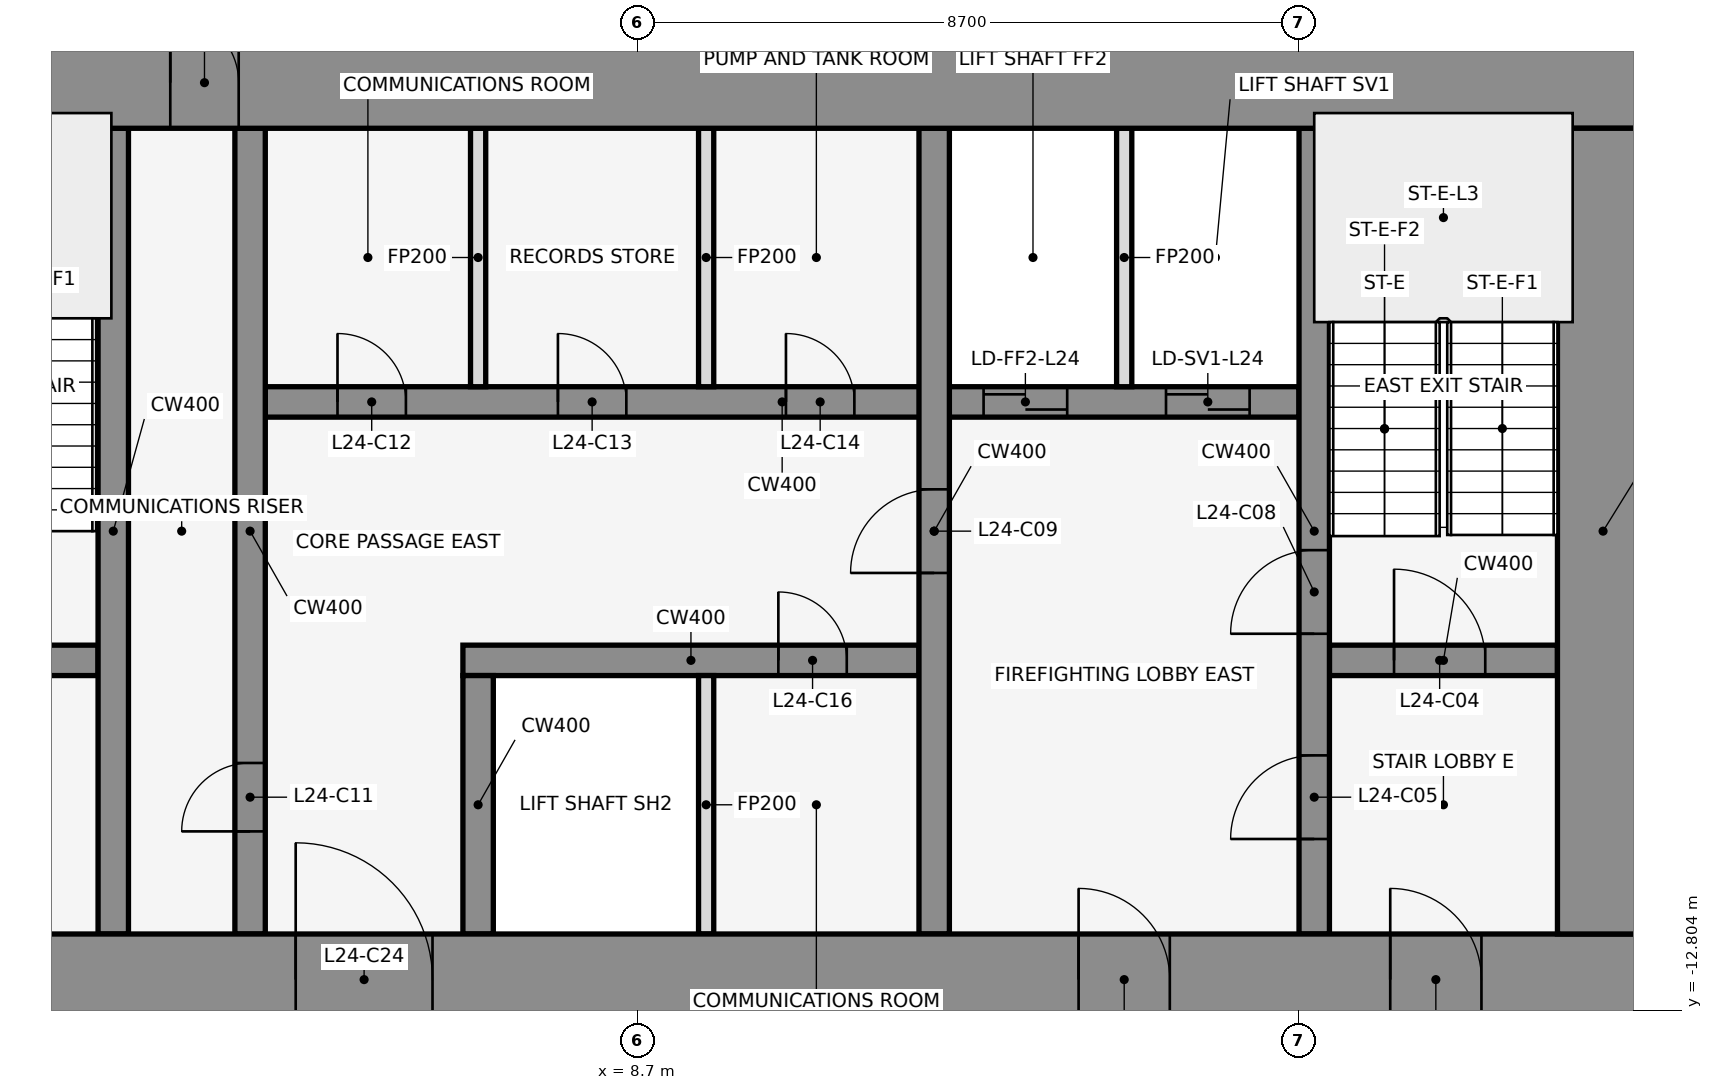
"""IFC4 building model, lengths in metres.
Left out: names, types, materials, properties, quantities, classifications, styles, units other than length and angle.
Written with IfcOpenShell. Run it as: python <this file> out.ifc"""

import sys

from ifc_helpers import new_model, si_unit, direction, frame, frame_2d, origin, place, context, subcontext, project, spatial, rectangle, extrude, element, fill, save


model = new_model("IFC4")
c1 = context("Model", 3, precision=1e-05, world=origin(), true_north=direction((0.0, 1.0)))
c2 = subcontext(c1, "Body", "Model", "MODEL_VIEW")
j1 = project(units=[si_unit("LENGTHUNIT", "METRE"), si_unit("PLANEANGLEUNIT", "RADIAN")], contexts=[c1])
p1 = place(None, origin())
s1 = spatial("IfcSite", under=j1, at=p1, CompositionType="ELEMENT")
p2 = place(p1, origin())
s2 = spatial("IfcBuilding", under=s1, at=p2, CompositionType="ELEMENT")
p3 = place(p2, frame((0.0, 0.0, 114.5)))
s3 = spatial("IfcBuildingStorey", under=s2, at=p3, CompositionType="ELEMENT", Elevation=114.5)
for number, where, z_axis, x_axis in (
    (1, (16.432, -0.105, 0.0), (0.0, 0.0, 1.0), (-0.84, 0.543, 0.0)),
    (2, (1.901, 1.08, 0.0), (0.0, 0.0, 1.0), (-0.84, -0.543, 0.0)),
):
    element("IfcWall", number, at=place(p3, frame(where, z_axis=z_axis, x_axis=x_axis)), inside=s3, PredefinedType="STANDARD", context=c2, shape_type="SweptSolid", body=[
        extrude(rectangle(XDim=2.183, YDim=0.25, at=frame_2d((1.091, 0.0))), origin(), (0.0, 0.0, 1.0), 3.95),
    ])
p4 = place(p3, frame((-1.6, -8.2, 0.0), z_axis=(0.0, 0.0, 1.0), x_axis=(1.0, 0.0, 0.0)))
e3 = element("IfcWall", 3, at=p4, inside=s3, PredefinedType="SHEAR", context=c2, shape_type="SweptSolid", body=[
    extrude(rectangle(XDim=3.2, YDim=0.4, at=frame_2d((1.6, 0.0))), origin(), (0.0, 0.0, 1.0), 4.1),
])
p5 = place(p4, frame((1.05, 0.0, 0.0)))
e4 = element("IfcOpeningElement", 4, at=p5, cuts=e3, PredefinedType="OPENING", context=c2, shape_type="SweptSolid", body=[
    extrude(rectangle(XDim=1.2, YDim=2.1, at=frame_2d((0.6, 1.05))), frame((0.0, 0.212, 0.0), z_axis=(0.0, -1.0, 0.0), x_axis=(1.0, 0.0, 0.0)), (0.0, 0.0, 1.0), 0.424),
])
p6 = place(p3, frame((6.4, -8.2, 0.0), z_axis=(0.0, 0.0, 1.0), x_axis=(1.0, 0.0, 0.0)))
e5 = element("IfcWall", 5, at=p6, inside=s3, PredefinedType="SHEAR", context=c2, shape_type="SweptSolid", body=[
    extrude(rectangle(XDim=6.0, YDim=0.4, at=frame_2d((3.0, 0.0))), origin(), (0.0, 0.0, 1.0), 4.1),
])
p7 = place(p6, frame((4.15, 0.0, 0.0)))
e6 = element("IfcOpeningElement", 6, at=p7, cuts=e5, PredefinedType="OPENING", context=c2, shape_type="SweptSolid", body=[
    extrude(rectangle(XDim=0.9, YDim=2.1, at=frame_2d((0.45, 1.05))), frame((0.0, 0.212, 0.0), z_axis=(0.0, -1.0, 0.0), x_axis=(1.0, 0.0, 0.0)), (0.0, 0.0, 1.0), 0.424),
])
p8 = place(p3, frame((17.8, -8.2, 0.0), z_axis=(0.0, 0.0, 1.0), x_axis=(1.0, 0.0, 0.0)))
e7 = element("IfcWall", 7, at=p8, inside=s3, PredefinedType="SHEAR", context=c2, shape_type="SweptSolid", body=[
    extrude(rectangle(XDim=3.0, YDim=0.4, at=frame_2d((1.5, 0.0))), origin(), (0.0, 0.0, 1.0), 4.1),
])
p9 = place(p8, frame((0.85, 0.0, 0.0)))
e8 = element("IfcOpeningElement", 8, at=p9, cuts=e7, PredefinedType="OPENING", context=c2, shape_type="SweptSolid", body=[
    extrude(rectangle(XDim=1.2, YDim=2.1, at=frame_2d((0.6, 1.05))), frame((0.0, 0.212, 0.0), z_axis=(0.0, -1.0, 0.0), x_axis=(1.0, 0.0, 0.0)), (0.0, 0.0, 1.0), 0.424),
])
p10 = place(p3, frame((3.8, -4.8, 0.0), z_axis=(0.0, 0.0, 1.0), x_axis=(1.0, 0.0, 0.0)))
e9 = element("IfcWall", 9, at=p10, inside=s3, PredefinedType="SHEAR", context=c2, shape_type="SweptSolid", body=[
    extrude(rectangle(XDim=13.6, YDim=0.4, at=frame_2d((6.8, 0.0))), origin(), (0.0, 0.0, 1.0), 4.1),
])
p11 = place(p10, frame((9.45, 0.0, 0.0)))
e10 = element("IfcOpeningElement", 10, at=p11, cuts=e9, PredefinedType="OPENING", context=c2, shape_type="SweptSolid", body=[
    extrude(rectangle(XDim=1.1, YDim=2.1, at=frame_2d((0.55, 1.05))), frame((0.0, 0.212, 0.0), z_axis=(0.0, -1.0, 0.0), x_axis=(1.0, 0.0, 0.0)), (0.0, 0.0, 1.0), 0.424),
])
p12 = place(p10, frame((11.85, 0.0, 0.0)))
e11 = element("IfcOpeningElement", 11, at=p12, cuts=e9, PredefinedType="OPENING", context=c2, shape_type="SweptSolid", body=[
    extrude(rectangle(XDim=1.1, YDim=2.1, at=frame_2d((0.55, 1.05))), frame((0.0, 0.212, 0.0), z_axis=(0.0, -1.0, 0.0), x_axis=(1.0, 0.0, 0.0)), (0.0, 0.0, 1.0), 0.424),
])
p13 = place(p10, frame((0.95, 0.0, 0.0)))
e12 = element("IfcOpeningElement", 12, at=p13, cuts=e9, PredefinedType="OPENING", context=c2, shape_type="SweptSolid", body=[
    extrude(rectangle(XDim=0.9, YDim=2.1, at=frame_2d((0.45, 1.05))), frame((0.0, 0.212, 0.0), z_axis=(0.0, -1.0, 0.0), x_axis=(1.0, 0.0, 0.0)), (0.0, 0.0, 1.0), 0.424),
])
p14 = place(p10, frame((3.85, 0.0, 0.0)))
e13 = element("IfcOpeningElement", 13, at=p14, cuts=e9, PredefinedType="OPENING", context=c2, shape_type="SweptSolid", body=[
    extrude(rectangle(XDim=0.9, YDim=2.1, at=frame_2d((0.45, 1.05))), frame((0.0, 0.212, 0.0), z_axis=(0.0, -1.0, 0.0), x_axis=(1.0, 0.0, 0.0)), (0.0, 0.0, 1.0), 0.424),
])
p15 = place(p10, frame((6.85, 0.0, 0.0)))
e14 = element("IfcOpeningElement", 14, at=p15, cuts=e9, PredefinedType="OPENING", context=c2, shape_type="SweptSolid", body=[
    extrude(rectangle(XDim=0.9, YDim=2.1, at=frame_2d((0.45, 1.05))), frame((0.0, 0.212, 0.0), z_axis=(0.0, -1.0, 0.0), x_axis=(1.0, 0.0, 0.0)), (0.0, 0.0, 1.0), 0.424),
])
p16 = place(p3, frame((1.8, -11.8, 0.0), z_axis=(0.0, 0.0, 1.0), x_axis=(0.0, 1.0, 0.0)))
e15 = element("IfcWall", 15, at=p16, inside=s3, PredefinedType="SHEAR", context=c2, shape_type="SweptSolid", body=[
    extrude(rectangle(XDim=10.6, YDim=0.4, at=frame_2d((5.3, 0.0))), origin(), (0.0, 0.0, 1.0), 4.1),
])
p17 = place(p3, frame((3.6, -11.8, 0.0), z_axis=(0.0, 0.0, 1.0), x_axis=(0.0, 1.0, 0.0)))
e16 = element("IfcWall", 16, at=p17, inside=s3, PredefinedType="SHEAR", context=c2, shape_type="SweptSolid", body=[
    extrude(rectangle(XDim=10.6, YDim=0.4, at=frame_2d((5.3, 0.0))), origin(), (0.0, 0.0, 1.0), 4.1),
])
p18 = place(p17, frame((1.35, 0.0, 0.0)))
e17 = element("IfcOpeningElement", 17, at=p18, cuts=e16, PredefinedType="OPENING", context=c2, shape_type="SweptSolid", body=[
    extrude(rectangle(XDim=0.9, YDim=2.1, at=frame_2d((0.45, 1.05))), frame((0.0, 0.212, 0.0), z_axis=(0.0, -1.0, 0.0), x_axis=(1.0, 0.0, 0.0)), (0.0, 0.0, 1.0), 0.424),
])
p19 = place(p3, frame((6.6, -11.8, 0.0), z_axis=(0.0, 0.0, 1.0), x_axis=(0.0, 1.0, 0.0)))
e18 = element("IfcWall", 18, at=p19, inside=s3, PredefinedType="SHEAR", context=c2, shape_type="SweptSolid", body=[
    extrude(rectangle(XDim=3.4, YDim=0.4, at=frame_2d((1.7, 0.0))), origin(), (0.0, 0.0, 1.0), 4.1),
])
for number, where, z_axis, x_axis in (
    (19, (6.6, -4.6, 0.0), (0.0, 0.0, 1.0), (0.0, 1.0, 0.0)),
    (20, (9.6, -11.8, 0.0), (0.0, 0.0, 1.0), (0.0, 1.0, 0.0)),
    (21, (9.6, -4.6, 0.0), (0.0, 0.0, 1.0), (0.0, 1.0, 0.0)),
):
    element("IfcWall", number, at=place(p3, frame(where, z_axis=z_axis, x_axis=x_axis)), inside=s3, PredefinedType="PARTITIONING", context=c2, shape_type="SweptSolid", body=[
        extrude(rectangle(XDim=3.4, YDim=0.2, at=frame_2d((1.7, 0.0))), origin(), (0.0, 0.0, 1.0), 3.018),
    ])
p20 = place(p3, frame((12.6, -11.8, 0.0), z_axis=(0.0, 0.0, 1.0), x_axis=(0.0, 1.0, 0.0)))
e22 = element("IfcWall", 22, at=p20, inside=s3, PredefinedType="SHEAR", context=c2, shape_type="SweptSolid", body=[
    extrude(rectangle(XDim=10.6, YDim=0.4, at=frame_2d((5.3, 0.0))), origin(), (0.0, 0.0, 1.0), 4.1),
])
p21 = place(p20, frame((4.75, 0.0, 0.0)))
e23 = element("IfcOpeningElement", 23, at=p21, cuts=e22, PredefinedType="OPENING", context=c2, shape_type="SweptSolid", body=[
    extrude(rectangle(XDim=1.1, YDim=2.1, at=frame_2d((0.55, 1.05))), frame((0.0, 0.212, 0.0), z_axis=(0.0, -1.0, 0.0), x_axis=(1.0, 0.0, 0.0)), (0.0, 0.0, 1.0), 0.424),
])
p22 = place(p3, frame((15.1, -4.6, 0.0), z_axis=(0.0, 0.0, 1.0), x_axis=(0.0, 1.0, 0.0)))
e24 = element("IfcWall", 24, at=p22, inside=s3, PredefinedType="PARTITIONING", context=c2, shape_type="SweptSolid", body=[
    extrude(rectangle(XDim=3.4, YDim=0.2, at=frame_2d((1.7, 0.0))), origin(), (0.0, 0.0, 1.0), 3.018),
])
p23 = place(p3, frame((17.6, -11.8, 0.0), z_axis=(0.0, 0.0, 1.0), x_axis=(0.0, 1.0, 0.0)))
e25 = element("IfcWall", 25, at=p23, inside=s3, PredefinedType="SHEAR", context=c2, shape_type="SweptSolid", body=[
    extrude(rectangle(XDim=10.6, YDim=0.4, at=frame_2d((5.3, 0.0))), origin(), (0.0, 0.0, 1.0), 4.1),
])
p24 = place(p23, frame((1.25, 0.0, 0.0)))
e26 = element("IfcOpeningElement", 26, at=p24, cuts=e25, PredefinedType="OPENING", context=c2, shape_type="SweptSolid", body=[
    extrude(rectangle(XDim=1.1, YDim=2.1, at=frame_2d((0.55, 1.05))), frame((0.0, 0.212, 0.0), z_axis=(0.0, -1.0, 0.0), x_axis=(1.0, 0.0, 0.0)), (0.0, 0.0, 1.0), 0.424),
])
p25 = place(p23, frame((3.95, 0.0, 0.0)))
e27 = element("IfcOpeningElement", 27, at=p25, cuts=e25, PredefinedType="OPENING", context=c2, shape_type="SweptSolid", body=[
    extrude(rectangle(XDim=1.1, YDim=2.1, at=frame_2d((0.55, 1.05))), frame((0.0, 0.212, 0.0), z_axis=(0.0, -1.0, 0.0), x_axis=(1.0, 0.0, 0.0)), (0.0, 0.0, 1.0), 0.424),
])
p26 = place(p3, frame((-22.0, -0.6, 0.0), z_axis=(0.0, 0.0, 1.0), x_axis=(1.0, 0.0, 0.0)))
e28 = element("IfcWall", 28, at=p26, inside=s3, PredefinedType="SHEAR", context=c2, shape_type="SweptSolid", body=[
    extrude(rectangle(XDim=44.0, YDim=1.2, at=frame_2d((22.0, 0.0))), origin(), (0.0, 0.0, 1.0), 4.1),
])
p27 = place(p26, frame((18.55, 0.0, 0.0)))
e29 = element("IfcOpeningElement", 29, at=p27, cuts=e28, PredefinedType="OPENING", context=c2, shape_type="SweptSolid", body=[
    extrude(rectangle(XDim=0.9, YDim=2.1, at=frame_2d((0.45, 1.05))), frame((0.0, 0.612, 0.0), z_axis=(0.0, -1.0, 0.0), x_axis=(1.0, 0.0, 0.0)), (0.0, 0.0, 1.0), 1.224),
])
p28 = place(p26, frame((24.55, 0.0, 0.0)))
e30 = element("IfcOpeningElement", 30, at=p28, cuts=e28, PredefinedType="OPENING", context=c2, shape_type="SweptSolid", body=[
    extrude(rectangle(XDim=0.9, YDim=2.1, at=frame_2d((0.45, 1.05))), frame((0.0, 0.612, 0.0), z_axis=(0.0, -1.0, 0.0), x_axis=(1.0, 0.0, 0.0)), (0.0, 0.0, 1.0), 1.224),
])
p29 = place(p3, frame((-22.0, -12.4, 0.0), z_axis=(0.0, 0.0, 1.0), x_axis=(1.0, 0.0, 0.0)))
e31 = element("IfcWall", 31, at=p29, inside=s3, PredefinedType="SHEAR", context=c2, shape_type="SweptSolid", body=[
    extrude(rectangle(XDim=44.0, YDim=1.2, at=frame_2d((22.0, 0.0))), origin(), (0.0, 0.0, 1.0), 4.1),
])
p30 = place(p29, frame((2.2, 0.0, 0.0)))
e32 = element("IfcOpeningElement", 32, at=p30, cuts=e31, PredefinedType="OPENING", context=c2, shape_type="SweptSolid", body=[
    extrude(rectangle(XDim=1.2, YDim=2.1, at=frame_2d((0.6, 1.05))), frame((0.0, 0.612, 0.0), z_axis=(0.0, -1.0, 0.0), x_axis=(1.0, 0.0, 0.0)), (0.0, 0.0, 1.0), 1.224),
])
p31 = place(p29, frame((21.4, 0.0, 0.0)))
e33 = element("IfcOpeningElement", 33, at=p31, cuts=e31, PredefinedType="OPENING", context=c2, shape_type="SweptSolid", body=[
    extrude(rectangle(XDim=1.2, YDim=2.1, at=frame_2d((0.6, 1.05))), frame((0.0, 0.612, 0.0), z_axis=(0.0, -1.0, 0.0), x_axis=(1.0, 0.0, 0.0)), (0.0, 0.0, 1.0), 1.224),
])
p32 = place(p29, frame((40.6, 0.0, 0.0)))
e34 = element("IfcOpeningElement", 34, at=p32, cuts=e31, PredefinedType="OPENING", context=c2, shape_type="SweptSolid", body=[
    extrude(rectangle(XDim=1.2, YDim=2.1, at=frame_2d((0.6, 1.05))), frame((0.0, 0.612, 0.0), z_axis=(0.0, -1.0, 0.0), x_axis=(1.0, 0.0, 0.0)), (0.0, 0.0, 1.0), 1.224),
])
p33 = place(p29, frame((16.0, 0.0, 0.0)))
e35 = element("IfcOpeningElement", 35, at=p33, cuts=e31, PredefinedType="OPENING", context=c2, shape_type="SweptSolid", body=[
    extrude(rectangle(XDim=1.8, YDim=2.1, at=frame_2d((0.9, 1.05))), frame((0.0, 0.612, 0.0), z_axis=(0.0, -1.0, 0.0), x_axis=(1.0, 0.0, 0.0)), (0.0, 0.0, 1.0), 1.224),
])
p34 = place(p29, frame((6.3, 0.0, 0.0)))
e36 = element("IfcOpeningElement", 36, at=p34, cuts=e31, PredefinedType="OPENING", context=c2, shape_type="SweptSolid", body=[
    extrude(rectangle(XDim=1.2, YDim=2.1, at=frame_2d((0.6, 1.05))), frame((0.0, 0.612, 0.0), z_axis=(0.0, -1.0, 0.0), x_axis=(1.0, 0.0, 0.0)), (0.0, 0.0, 1.0), 1.224),
])
p35 = place(p29, frame((26.2, 0.0, 0.0)))
e37 = element("IfcOpeningElement", 37, at=p35, cuts=e31, PredefinedType="OPENING", context=c2, shape_type="SweptSolid", body=[
    extrude(rectangle(XDim=1.8, YDim=2.1, at=frame_2d((0.9, 1.05))), frame((0.0, 0.612, 0.0), z_axis=(0.0, -1.0, 0.0), x_axis=(1.0, 0.0, 0.0)), (0.0, 0.0, 1.0), 1.224),
])
p36 = place(p29, frame((36.5, 0.0, 0.0)))
e38 = element("IfcOpeningElement", 38, at=p36, cuts=e31, PredefinedType="OPENING", context=c2, shape_type="SweptSolid", body=[
    extrude(rectangle(XDim=1.2, YDim=2.1, at=frame_2d((0.6, 1.05))), frame((0.0, 0.612, 0.0), z_axis=(0.0, -1.0, 0.0), x_axis=(1.0, 0.0, 0.0)), (0.0, 0.0, 1.0), 1.224),
])
p37 = place(p3, frame((21.4, -11.8, 0.0), z_axis=(0.0, 0.0, 1.0), x_axis=(0.0, 1.0, 0.0)))
e39 = element("IfcWall", 39, at=p37, inside=s3, PredefinedType="SHEAR", context=c2, shape_type="SweptSolid", body=[
    extrude(rectangle(XDim=10.6, YDim=1.2, at=frame_2d((5.3, 0.0))), origin(), (0.0, 0.0, 1.0), 4.1),
])
p38 = place(p9, origin())
e40 = element("IfcDoor", 40, at=p38, inside=s3, OperationType="SINGLE_SWING_RIGHT", PredefinedType="DOOR", context=c2, shape_type="SweptSolid", body=[
    extrude(rectangle(XDim=1.2, YDim=2.1, at=frame_2d((0.6, 1.05))), frame((0.0, 0.025, 0.0), z_axis=(0.0, -1.0, 0.0), x_axis=(1.0, 0.0, 0.0)), (0.0, 0.0, 1.0), 0.05),
])
fill(e8, e40)
p39 = place(p24, origin())
e41 = element("IfcDoor", 41, at=p39, inside=s3, OperationType="SINGLE_SWING_LEFT", PredefinedType="DOOR", context=c2, shape_type="SweptSolid", body=[
    extrude(rectangle(XDim=1.1, YDim=2.1, at=frame_2d((0.55, 1.05))), frame((0.0, 0.025, 0.0), z_axis=(0.0, -1.0, 0.0), x_axis=(1.0, 0.0, 0.0)), (0.0, 0.0, 1.0), 0.05),
])
fill(e26, e41)
p40 = place(p11, origin())
e42 = element("IfcDoor", 42, at=p40, inside=s3, OperationType="DOUBLE_DOOR_SLIDING", PredefinedType="DOOR", context=c2, shape_type="SweptSolid", body=[
    extrude(rectangle(XDim=1.1, YDim=2.1, at=frame_2d((0.55, 1.05))), frame((0.0, 0.025, 0.0), z_axis=(0.0, -1.0, 0.0), x_axis=(1.0, 0.0, 0.0)), (0.0, 0.0, 1.0), 0.05),
])
fill(e10, e42)
p41 = place(p12, origin())
e43 = element("IfcDoor", 43, at=p41, inside=s3, OperationType="DOUBLE_DOOR_SLIDING", PredefinedType="DOOR", context=c2, shape_type="SweptSolid", body=[
    extrude(rectangle(XDim=1.1, YDim=2.1, at=frame_2d((0.55, 1.05))), frame((0.0, 0.025, 0.0), z_axis=(0.0, -1.0, 0.0), x_axis=(1.0, 0.0, 0.0)), (0.0, 0.0, 1.0), 0.05),
])
fill(e11, e43)
p42 = place(p25, origin())
e44 = element("IfcDoor", 44, at=p42, inside=s3, OperationType="SINGLE_SWING_RIGHT", PredefinedType="DOOR", context=c2, shape_type="SweptSolid", body=[
    extrude(rectangle(XDim=1.1, YDim=2.1, at=frame_2d((0.55, 1.05))), frame((0.0, 0.025, 0.0), z_axis=(0.0, -1.0, 0.0), x_axis=(1.0, 0.0, 0.0)), (0.0, 0.0, 1.0), 0.05),
])
fill(e27, e44)
p43 = place(p21, frame((1.1, 0.0, 0.0), z_axis=(0.0, 0.0, 1.0), x_axis=(-1.0, 0.0, 0.0)))
e45 = element("IfcDoor", 45, at=p43, inside=s3, OperationType="SINGLE_SWING_RIGHT", PredefinedType="DOOR", context=c2, shape_type="SweptSolid", body=[
    extrude(rectangle(XDim=1.1, YDim=2.1, at=frame_2d((0.55, 1.05))), frame((0.0, 0.025, 0.0), z_axis=(0.0, -1.0, 0.0), x_axis=(1.0, 0.0, 0.0)), (0.0, 0.0, 1.0), 0.05),
])
fill(e23, e45)
p44 = place(p18, origin())
e46 = element("IfcDoor", 46, at=p44, inside=s3, OperationType="SINGLE_SWING_LEFT", PredefinedType="DOOR", context=c2, shape_type="SweptSolid", body=[
    extrude(rectangle(XDim=0.9, YDim=2.1, at=frame_2d((0.45, 1.05))), frame((0.0, 0.025, 0.0), z_axis=(0.0, -1.0, 0.0), x_axis=(1.0, 0.0, 0.0)), (0.0, 0.0, 1.0), 0.05),
])
fill(e17, e46)
p45 = place(p13, origin())
e47 = element("IfcDoor", 47, at=p45, inside=s3, OperationType="SINGLE_SWING_RIGHT", PredefinedType="DOOR", context=c2, shape_type="SweptSolid", body=[
    extrude(rectangle(XDim=0.9, YDim=2.1, at=frame_2d((0.45, 1.05))), frame((0.0, 0.025, 0.0), z_axis=(0.0, -1.0, 0.0), x_axis=(1.0, 0.0, 0.0)), (0.0, 0.0, 1.0), 0.05),
])
fill(e12, e47)
p46 = place(p14, origin())
e48 = element("IfcDoor", 48, at=p46, inside=s3, OperationType="SINGLE_SWING_LEFT", PredefinedType="DOOR", context=c2, shape_type="SweptSolid", body=[
    extrude(rectangle(XDim=0.9, YDim=2.1, at=frame_2d((0.45, 1.05))), frame((0.0, 0.025, 0.0), z_axis=(0.0, -1.0, 0.0), x_axis=(1.0, 0.0, 0.0)), (0.0, 0.0, 1.0), 0.05),
])
fill(e13, e48)
p47 = place(p15, origin())
e49 = element("IfcDoor", 49, at=p47, inside=s3, OperationType="SINGLE_SWING_RIGHT", PredefinedType="DOOR", context=c2, shape_type="SweptSolid", body=[
    extrude(rectangle(XDim=0.9, YDim=2.1, at=frame_2d((0.45, 1.05))), frame((0.0, 0.025, 0.0), z_axis=(0.0, -1.0, 0.0), x_axis=(1.0, 0.0, 0.0)), (0.0, 0.0, 1.0), 0.05),
])
fill(e14, e49)
p48 = place(p7, frame((0.9, 0.0, 0.0), z_axis=(0.0, 0.0, 1.0), x_axis=(-1.0, 0.0, 0.0)))
e50 = element("IfcDoor", 50, at=p48, inside=s3, OperationType="SINGLE_SWING_LEFT", PredefinedType="DOOR", context=c2, shape_type="SweptSolid", body=[
    extrude(rectangle(XDim=0.9, YDim=2.1, at=frame_2d((0.45, 1.05))), frame((0.0, 0.025, 0.0), z_axis=(0.0, -1.0, 0.0), x_axis=(1.0, 0.0, 0.0)), (0.0, 0.0, 1.0), 0.05),
])
fill(e6, e50)
p49 = place(p28, origin())
e51 = element("IfcDoor", 51, at=p49, inside=s3, OperationType="SINGLE_SWING_LEFT", PredefinedType="DOOR", context=c2, shape_type="SweptSolid", body=[
    extrude(rectangle(XDim=0.9, YDim=2.1, at=frame_2d((0.45, 1.05))), frame((0.0, 0.025, 0.0), z_axis=(0.0, -1.0, 0.0), x_axis=(1.0, 0.0, 0.0)), (0.0, 0.0, 1.0), 0.05),
])
fill(e30, e51)
p50 = place(p32, frame((1.2, 0.0, 0.0), z_axis=(0.0, 0.0, 1.0), x_axis=(-1.0, 0.0, 0.0)))
e52 = element("IfcDoor", 52, at=p50, inside=s3, OperationType="SINGLE_SWING_RIGHT", PredefinedType="DOOR", context=c2, shape_type="SweptSolid", body=[
    extrude(rectangle(XDim=1.2, YDim=2.1, at=frame_2d((0.6, 1.05))), frame((0.0, 0.025, 0.0), z_axis=(0.0, -1.0, 0.0), x_axis=(1.0, 0.0, 0.0)), (0.0, 0.0, 1.0), 0.05),
])
fill(e34, e52)
p51 = place(p35, origin())
e53 = element("IfcDoor", 53, at=p51, inside=s3, OperationType="SINGLE_SWING_LEFT", PredefinedType="DOOR", context=c2, shape_type="SweptSolid", body=[
    extrude(rectangle(XDim=1.8, YDim=2.1, at=frame_2d((0.9, 1.05))), frame((0.0, 0.025, 0.0), z_axis=(0.0, -1.0, 0.0), x_axis=(1.0, 0.0, 0.0)), (0.0, 0.0, 1.0), 0.05),
])
fill(e37, e53)
p52 = place(p36, frame((1.2, 0.0, 0.0), z_axis=(0.0, 0.0, 1.0), x_axis=(-1.0, 0.0, 0.0)))
e54 = element("IfcDoor", 54, at=p52, inside=s3, OperationType="SINGLE_SWING_RIGHT", PredefinedType="DOOR", context=c2, shape_type="SweptSolid", body=[
    extrude(rectangle(XDim=1.2, YDim=2.1, at=frame_2d((0.6, 1.05))), frame((0.0, 0.025, 0.0), z_axis=(0.0, -1.0, 0.0), x_axis=(1.0, 0.0, 0.0)), (0.0, 0.0, 1.0), 0.05),
])
fill(e38, e54)
save(model, sys.argv[1])
